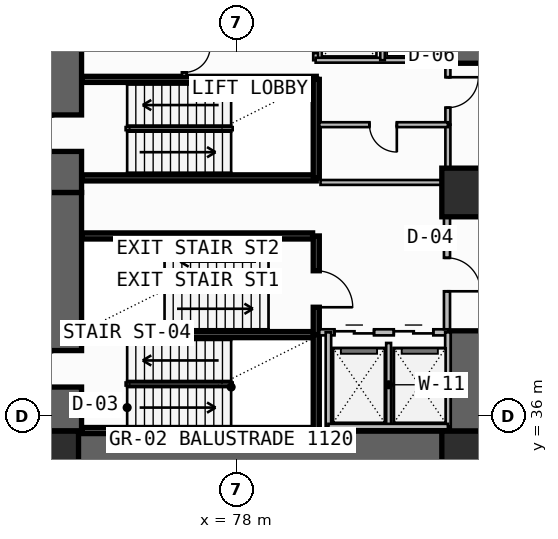
"""IFC4 building model, lengths in metres.
Left out: names, types, materials, properties, quantities, classifications, styles, units other than length and angle.
Written with IfcOpenShell. Run it as: python <this file> out.ifc"""

import sys

from ifc_helpers import new_model, si_unit, direction, frame, frame_2d, origin, origin_2d, place, context, subcontext, project, spatial, rectangle, extrude, element, fill, save


model = new_model("IFC4")
c1 = context("Model", 3, precision=1e-05, world=origin(), true_north=direction((0.0, 1.0)))
c2 = subcontext(c1, "Body", "Model", "MODEL_VIEW")
j1 = project(units=[si_unit("LENGTHUNIT", "METRE"), si_unit("PLANEANGLEUNIT", "RADIAN")], contexts=[c1])
p1 = place(None, origin())
s1 = spatial("IfcSite", under=j1, at=p1, CompositionType="ELEMENT")
p2 = place(p1, origin())
s2 = spatial("IfcBuilding", under=s1, at=p2, CompositionType="ELEMENT")
p3 = place(p2, origin())
s3 = spatial("IfcBuildingStorey", under=s2, at=p3, CompositionType="ELEMENT", Elevation=0.0)
p4 = place(p3, frame((72.35, 35.5, -0.4), z_axis=(0.0, 0.0, 1.0), x_axis=(0.0, 1.0, 0.0)))
e1 = element("IfcWall", 1, at=p4, inside=s3, PredefinedType="SHEAR", context=c2, shape_type="SweptSolid", body=[
    extrude(rectangle(XDim=7.85, YDim=1.1, at=frame_2d((3.925, 0.0))), origin(), (0.0, 0.0, 1.0), 4.58),
])
p5 = place(p4, frame((1.45, 0.0, 0.4)))
e2 = element("IfcOpeningElement", 2, at=p5, cuts=e1, PredefinedType="OPENING", context=c2, shape_type="SweptSolid", body=[
    extrude(rectangle(XDim=1.2, YDim=2.2, at=frame_2d((0.6, 1.1))), frame((0.0, 0.56, 0.0), z_axis=(0.0, -1.0, 0.0), x_axis=(1.0, 0.0, 0.0)), (0.0, 0.0, 1.0), 1.12),
])
p6 = place(p3, frame((71.8, 34.95, -0.4), z_axis=(0.0, 0.0, 1.0), x_axis=(1.0, 0.0, 0.0)))
e3 = element("IfcWall", 3, at=p6, inside=s3, PredefinedType="SHEAR", context=c2, shape_type="SweptSolid", body=[
    extrude(rectangle(XDim=14.3, YDim=1.1, at=frame_2d((7.15, 0.0))), origin(), (0.0, 0.0, 1.0), 4.58),
])
p7 = place(p3, frame((85.55, 35.5, -0.4), z_axis=(0.0, 0.0, 1.0), x_axis=(0.0, 1.0, 0.0)))
e4 = element("IfcWall", 4, at=p7, inside=s3, PredefinedType="SHEAR", context=c2, shape_type="SweptSolid", body=[
    extrude(rectangle(XDim=3.3, YDim=1.1, at=frame_2d((1.65, 0.0))), origin(), (0.0, 0.0, 1.0), 4.58),
])
p8 = place(p3, frame((72.35, 43.35, -0.4), z_axis=(0.0, 0.0, 1.0), x_axis=(0.0, 1.0, 0.0)))
e5 = element("IfcWall", 5, at=p8, inside=s3, PredefinedType="SHEAR", context=c2, shape_type="SweptSolid", body=[
    extrude(rectangle(XDim=12.7, YDim=1.1, at=frame_2d((6.35, 0.0))), origin(), (0.0, 0.0, 1.0), 4.58),
])
p9 = place(p8, frame((1.35, 0.0, 0.4)))
e6 = element("IfcOpeningElement", 6, at=p9, cuts=e5, PredefinedType="OPENING", context=c2, shape_type="SweptSolid", body=[
    extrude(rectangle(XDim=1.2, YDim=2.2, at=frame_2d((0.6, 1.1))), frame((0.0, 0.56, 0.0), z_axis=(0.0, -1.0, 0.0), x_axis=(1.0, 0.0, 0.0)), (0.0, 0.0, 1.0), 1.12),
])
p10 = place(p3, frame((85.55, 47.6, -0.4), z_axis=(0.0, 0.0, 1.0), x_axis=(0.0, 1.0, 0.0)))
e7 = element("IfcWall", 7, at=p10, inside=s3, PredefinedType="SHEAR", context=c2, shape_type="SweptSolid", body=[
    extrude(rectangle(XDim=8.45, YDim=1.1, at=frame_2d((4.225, 0.0))), origin(), (0.0, 0.0, 1.0), 4.58),
])
for number, where, z_axis, x_axis in (
    (8, (72.0, 34.7, 0.0), (0.0, 0.0, 1.0), (1.0, 0.0, 0.0)),
    (9, (85.55, 34.7, 0.0), (0.0, 0.0, 1.0), (1.0, 0.0, 0.0)),
    (10, (85.55, 43.35, 0.0), (0.0, 0.0, 1.0), (1.0, 0.0, 0.0)),
):
    element("IfcColumn", number, at=place(p3, frame(where, z_axis=z_axis, x_axis=x_axis)), inside=s3, PredefinedType="COLUMN", context=c2, shape_type="SweptSolid", body=[
        extrude(rectangle(XDim=1.6, YDim=1.6, at=origin_2d()), origin(), (0.0, 0.0, 1.0), 4.5),
    ])
for number, where, z_axis, x_axis in (
    (11, (72.92, 35.52, -0.4), (0.0, 0.0, 1.0), (1.0, 0.0, 0.0)),
    (12, (72.92, 38.675, -0.4), (0.0, 0.0, 1.0), (1.0, 0.0, 0.0)),
):
    element("IfcWall", number, at=place(p3, frame(where, z_axis=z_axis, x_axis=x_axis)), inside=s3, PredefinedType="SOLIDWALL", context=c2, shape_type="SweptSolid", body=[
        extrude(rectangle(XDim=7.7, YDim=0.2, at=frame_2d((3.85, 0.0))), origin(), (0.0, 0.0, 1.0), 4.58),
    ])
p11 = place(p3, frame((80.62, 35.52, -0.4), z_axis=(0.0, 0.0, 1.0), x_axis=(0.0, 1.0, 0.0)))
e13 = element("IfcWall", 13, at=p11, inside=s3, PredefinedType="SOLIDWALL", context=c2, shape_type="SweptSolid", body=[
    extrude(rectangle(XDim=3.155, YDim=0.2, at=frame_2d((1.578, 0.0))), origin(), (0.0, 0.0, 1.0), 4.58),
])
p12 = place(p3, frame((80.62, 38.675, -0.4), z_axis=(0.0, 0.0, 1.0), x_axis=(0.0, 1.0, 0.0)))
e14 = element("IfcWall", 14, at=p12, inside=s3, PredefinedType="SOLIDWALL", context=c2, shape_type="SweptSolid", body=[
    extrude(rectangle(XDim=3.245, YDim=0.2, at=frame_2d((1.623, 0.0))), origin(), (0.0, 0.0, 1.0), 4.58),
])
p13 = place(p12, frame((0.9, 0.0, 0.4)))
e15 = element("IfcOpeningElement", 15, at=p13, cuts=e14, PredefinedType="OPENING", context=c2, shape_type="SweptSolid", body=[
    extrude(rectangle(XDim=1.2, YDim=2.2, at=frame_2d((0.6, 1.1))), frame((0.0, 0.11, 0.0), z_axis=(0.0, -1.0, 0.0), x_axis=(1.0, 0.0, 0.0)), (0.0, 0.0, 1.0), 0.22),
])
p14 = place(p3, frame((80.72, 38.75, 0.0), z_axis=(0.0, 0.0, 1.0), x_axis=(1.0, 0.0, 0.0)))
e16 = element("IfcWall", 16, at=p14, inside=s3, PredefinedType="SOLIDWALL", context=c2, shape_type="SweptSolid", body=[
    extrude(rectangle(XDim=4.26, YDim=0.2, at=frame_2d((2.13, 0.0))), origin(), (0.0, 0.0, 1.0), 4.18),
])
p15 = place(p14, frame((0.5, 0.0, 0.0)))
e17 = element("IfcOpeningElement", 17, at=p15, cuts=e16, PredefinedType="OPENING", context=c2, shape_type="SweptSolid", body=[
    extrude(rectangle(XDim=1.3, YDim=2.3, at=frame_2d((0.65, 1.15))), frame((0.0, 0.11, 0.0), z_axis=(0.0, -1.0, 0.0), x_axis=(1.0, 0.0, 0.0)), (0.0, 0.0, 1.0), 0.22),
])
p16 = place(p14, frame((2.45, 0.0, 0.0)))
e18 = element("IfcOpeningElement", 18, at=p16, cuts=e16, PredefinedType="OPENING", context=c2, shape_type="SweptSolid", body=[
    extrude(rectangle(XDim=1.3, YDim=2.3, at=frame_2d((0.65, 1.15))), frame((0.0, 0.11, 0.0), z_axis=(0.0, -1.0, 0.0), x_axis=(1.0, 0.0, 0.0)), (0.0, 0.0, 1.0), 0.22),
])
p17 = place(p3, frame((83.0, 35.65, 0.0), z_axis=(0.0, 0.0, 1.0), x_axis=(0.0, 1.0, 0.0)))
e19 = element("IfcWall", 19, at=p17, inside=s3, PredefinedType="PLUMBINGWALL", context=c2, shape_type="SweptSolid", body=[
    extrude(rectangle(XDim=2.75, YDim=0.16, at=frame_2d((1.375, 0.0))), origin(), (0.0, 0.0, 1.0), 4.18),
])
for number, where, z_axis, x_axis in (
    (20, (84.95, 35.65, 0.0), (0.0, 0.0, 1.0), (0.0, 1.0, 0.0)),
    (21, (81.02, 35.65, 0.0), (0.0, 0.0, 1.0), (0.0, 1.0, 0.0)),
):
    element("IfcWall", number, at=place(p3, frame(where, z_axis=z_axis, x_axis=x_axis)), inside=s3, PredefinedType="SOLIDWALL", context=c2, shape_type="SweptSolid", body=[
        extrude(rectangle(XDim=3.1, YDim=0.18, at=frame_2d((1.55, 0.0))), origin(), (0.0, 0.0, 1.0), 4.18),
    ])
p18 = place(p3, frame((81.02, 35.65, 0.0), z_axis=(0.0, 0.0, 1.0), x_axis=(1.0, 0.0, 0.0)))
e22 = element("IfcWall", 22, at=p18, inside=s3, PredefinedType="SOLIDWALL", context=c2, shape_type="SweptSolid", body=[
    extrude(rectangle(XDim=3.93, YDim=0.18, at=frame_2d((1.965, 0.0))), origin(), (0.0, 0.0, 1.0), 4.18),
])
p19 = place(p3, frame((84.92, 38.85, 0.0), z_axis=(0.0, 0.0, 1.0), x_axis=(0.0, 1.0, 0.0)))
e23 = element("IfcWall", 23, at=p19, inside=s3, PredefinedType="SOLIDWALL", context=c2, shape_type="SweptSolid", body=[
    extrude(rectangle(XDim=4.83, YDim=0.2, at=frame_2d((2.415, 0.0))), origin(), (0.0, 0.0, 1.0), 4.18),
])
p20 = place(p19, frame((1.25, 0.0, 0.0)))
e24 = element("IfcOpeningElement", 24, at=p20, cuts=e23, PredefinedType="OPENING", context=c2, shape_type="SweptSolid", body=[
    extrude(rectangle(XDim=1.1, YDim=2.2, at=frame_2d((0.55, 1.1))), frame((0.0, 0.11, 0.0), z_axis=(0.0, -1.0, 0.0), x_axis=(1.0, 0.0, 0.0)), (0.0, 0.0, 1.0), 0.22),
])
p21 = place(p3, frame((72.92, 41.92, -0.4), z_axis=(0.0, 0.0, 1.0), x_axis=(1.0, 0.0, 0.0)))
e25 = element("IfcWall", 25, at=p21, inside=s3, PredefinedType="SOLIDWALL", context=c2, shape_type="SweptSolid", body=[
    extrude(rectangle(XDim=7.58, YDim=0.2, at=frame_2d((3.79, 0.0))), origin(), (0.0, 0.0, 1.0), 4.58),
])
for number, where, z_axis, x_axis in (
    (26, (72.92, 43.83, -0.4), (0.0, 0.0, 1.0), (1.0, 0.0, 0.0)),
    (27, (72.92, 47.07, -0.4), (0.0, 0.0, 1.0), (1.0, 0.0, 0.0)),
):
    element("IfcWall", number, at=place(p3, frame(where, z_axis=z_axis, x_axis=x_axis)), inside=s3, PredefinedType="SOLIDWALL", context=c2, shape_type="SweptSolid", body=[
        extrude(rectangle(XDim=7.7, YDim=0.2, at=frame_2d((3.85, 0.0))), origin(), (0.0, 0.0, 1.0), 4.58),
    ])
p22 = place(p3, frame((80.62, 43.83, -0.4), z_axis=(0.0, 0.0, 1.0), x_axis=(0.0, 1.0, 0.0)))
e28 = element("IfcWall", 28, at=p22, inside=s3, PredefinedType="SOLIDWALL", context=c2, shape_type="SweptSolid", body=[
    extrude(rectangle(XDim=3.24, YDim=0.2, at=frame_2d((1.62, 0.0))), origin(), (0.0, 0.0, 1.0), 4.58),
])
p23 = place(p3, frame((84.95, 43.68, 0.0), z_axis=(0.0, 0.0, 1.0), x_axis=(0.0, 1.0, 0.0)))
e29 = element("IfcWall", 29, at=p23, inside=s3, PredefinedType="PLUMBINGWALL", context=c2, shape_type="SweptSolid", body=[
    extrude(rectangle(XDim=1.9, YDim=0.165, at=frame_2d((0.95, 0.0))), origin(), (0.0, 0.0, 1.0), 4.18),
])
p24 = place(p3, frame((84.95, 45.58, 0.0), z_axis=(0.0, 0.0, 1.0), x_axis=(0.0, 1.0, 0.0)))
e30 = element("IfcWall", 30, at=p24, inside=s3, PredefinedType="PARTITIONING", context=c2, shape_type="SweptSolid", body=[
    extrude(rectangle(XDim=2.12, YDim=0.165, at=frame_2d((1.06, 0.0))), origin(), (0.0, 0.0, 1.0), 4.18),
])
p25 = place(p24, frame((0.56, 0.0, 0.0)))
e31 = element("IfcOpeningElement", 31, at=p25, cuts=e30, PredefinedType="OPENING", context=c2, shape_type="SweptSolid", body=[
    extrude(rectangle(XDim=1.0, YDim=2.2, at=frame_2d((0.5, 1.1))), frame((0.0, 0.093, 0.0), z_axis=(0.0, -1.0, 0.0), x_axis=(1.0, 0.0, 0.0)), (0.0, 0.0, 1.0), 0.185),
])
p26 = place(p3, frame((80.72, 45.58, 0.0), z_axis=(0.0, 0.0, 1.0), x_axis=(1.0, 0.0, 0.0)))
e32 = element("IfcWall", 32, at=p26, inside=s3, PredefinedType="PLUMBINGWALL", context=c2, shape_type="SweptSolid", body=[
    extrude(rectangle(XDim=4.23, YDim=0.16, at=frame_2d((2.115, 0.0))), origin(), (0.0, 0.0, 1.0), 4.18),
])
p27 = place(p26, frame((1.65, 0.0, 0.0)))
e33 = element("IfcOpeningElement", 33, at=p27, cuts=e32, PredefinedType="OPENING", context=c2, shape_type="SweptSolid", body=[
    extrude(rectangle(XDim=0.9, YDim=2.1, at=frame_2d((0.45, 1.05))), frame((0.0, 0.09, 0.0), z_axis=(0.0, -1.0, 0.0), x_axis=(1.0, 0.0, 0.0)), (0.0, 0.0, 1.0), 0.18),
])
p28 = place(p3, frame((80.76, 43.68, 0.0), z_axis=(0.0, 0.0, 1.0), x_axis=(1.0, 0.0, 0.0)))
e34 = element("IfcWall", 34, at=p28, inside=s3, PredefinedType="PLUMBINGWALL", context=c2, shape_type="SweptSolid", body=[
    extrude(rectangle(XDim=4.19, YDim=0.16, at=frame_2d((2.095, 0.0))), origin(), (0.0, 0.0, 1.0), 4.18),
])
p29 = place(p3, frame((76.28, 47.18, 0.0), z_axis=(0.0, 0.0, 1.0), x_axis=(0.0, 1.0, 0.0)))
e35 = element("IfcWall", 35, at=p29, inside=s3, PredefinedType="SOLIDWALL", context=c2, shape_type="SweptSolid", body=[
    extrude(rectangle(XDim=5.14, YDim=0.16, at=frame_2d((2.57, 0.0))), origin(), (0.0, 0.0, 1.0), 4.18),
])
p30 = place(p29, frame((1.1, 0.0, 0.0)))
e36 = element("IfcOpeningElement", 36, at=p30, cuts=e35, PredefinedType="OPENING", context=c2, shape_type="SweptSolid", body=[
    extrude(rectangle(XDim=1.1, YDim=2.25, at=frame_2d((0.55, 1.125))), frame((0.0, 0.09, 0.0), z_axis=(0.0, -1.0, 0.0), x_axis=(1.0, 0.0, 0.0)), (0.0, 0.0, 1.0), 0.18),
])
p31 = place(p29, frame((2.5, 0.0, 0.0)))
e37 = element("IfcOpeningElement", 37, at=p31, cuts=e35, PredefinedType="OPENING", context=c2, shape_type="SweptSolid", body=[
    extrude(rectangle(XDim=1.1, YDim=2.25, at=frame_2d((0.55, 1.125))), frame((0.0, 0.09, 0.0), z_axis=(0.0, -1.0, 0.0), x_axis=(1.0, 0.0, 0.0)), (0.0, 0.0, 1.0), 0.18),
])
p32 = place(p29, frame((3.9, 0.0, 0.0)))
e38 = element("IfcOpeningElement", 38, at=p32, cuts=e35, PredefinedType="OPENING", context=c2, shape_type="SweptSolid", body=[
    extrude(rectangle(XDim=1.1, YDim=2.25, at=frame_2d((0.55, 1.125))), frame((0.0, 0.09, 0.0), z_axis=(0.0, -1.0, 0.0), x_axis=(1.0, 0.0, 0.0)), (0.0, 0.0, 1.0), 0.18),
])
p33 = place(p29, frame((0.12, 0.0, 0.0)))
e39 = element("IfcOpeningElement", 39, at=p33, cuts=e35, PredefinedType="OPENING", context=c2, shape_type="SweptSolid", body=[
    extrude(rectangle(XDim=0.85, YDim=2.05, at=frame_2d((0.425, 1.025))), frame((0.0, 0.09, 0.0), z_axis=(0.0, -1.0, 0.0), x_axis=(1.0, 0.0, 0.0)), (0.0, 0.0, 1.0), 0.18),
])
p34 = place(p3, frame((80.6, 47.7, 0.0), z_axis=(0.0, 0.0, 1.0), x_axis=(0.0, 1.0, 0.0)))
e40 = element("IfcWall", 40, at=p34, inside=s3, PredefinedType="SOLIDWALL", context=c2, shape_type="SweptSolid", body=[
    extrude(rectangle(XDim=4.6, YDim=0.16, at=frame_2d((2.3, 0.0))), origin(), (0.0, 0.0, 1.0), 4.18),
])
p35 = place(p34, frame((0.24, 0.0, 0.0)))
e41 = element("IfcOpeningElement", 41, at=p35, cuts=e40, PredefinedType="OPENING", context=c2, shape_type="SweptSolid", body=[
    extrude(rectangle(XDim=1.1, YDim=2.25, at=frame_2d((0.55, 1.125))), frame((0.0, 0.09, 0.0), z_axis=(0.0, -1.0, 0.0), x_axis=(1.0, 0.0, 0.0)), (0.0, 0.0, 1.0), 0.18),
])
p36 = place(p34, frame((1.76, 0.0, 0.0)))
e42 = element("IfcOpeningElement", 42, at=p36, cuts=e40, PredefinedType="OPENING", context=c2, shape_type="SweptSolid", body=[
    extrude(rectangle(XDim=1.1, YDim=2.25, at=frame_2d((0.55, 1.125))), frame((0.0, 0.09, 0.0), z_axis=(0.0, -1.0, 0.0), x_axis=(1.0, 0.0, 0.0)), (0.0, 0.0, 1.0), 0.18),
])
p37 = place(p34, frame((3.28, 0.0, 0.0)))
e43 = element("IfcOpeningElement", 43, at=p37, cuts=e40, PredefinedType="OPENING", context=c2, shape_type="SweptSolid", body=[
    extrude(rectangle(XDim=1.1, YDim=2.25, at=frame_2d((0.55, 1.125))), frame((0.0, 0.09, 0.0), z_axis=(0.0, -1.0, 0.0), x_axis=(1.0, 0.0, 0.0)), (0.0, 0.0, 1.0), 0.18),
])
p38 = place(p3, frame((80.6, 47.7, 0.0), z_axis=(0.0, 0.0, 1.0), x_axis=(1.0, 0.0, 0.0)))
e44 = element("IfcWall", 44, at=p38, inside=s3, PredefinedType="SOLIDWALL", context=c2, shape_type="SweptSolid", body=[
    extrude(rectangle(XDim=4.4, YDim=0.16, at=frame_2d((2.2, 0.0))), origin(), (0.0, 0.0, 1.0), 4.18),
])
p39 = place(p3, frame((82.8, 47.7, 0.0), z_axis=(0.0, 0.0, 1.0), x_axis=(0.0, 1.0, 0.0)))
e45 = element("IfcWall", 45, at=p39, inside=s3, PredefinedType="PLUMBINGWALL", context=c2, shape_type="SweptSolid", body=[
    extrude(rectangle(XDim=4.6, YDim=0.15, at=frame_2d((2.3, 0.0))), origin(), (0.0, 0.0, 1.0), 4.18),
])
p40 = place(p3, frame((84.78, 47.7, 0.0), z_axis=(0.0, 0.0, 1.0), x_axis=(0.0, 1.0, 0.0)))
e46 = element("IfcWall", 46, at=p40, inside=s3, PredefinedType="SOLIDWALL", context=c2, shape_type="SweptSolid", body=[
    extrude(rectangle(XDim=4.6, YDim=0.16, at=frame_2d((2.3, 0.0))), origin(), (0.0, 0.0, 1.0), 4.18),
])
p41 = place(p5, origin())
e47 = element("IfcDoor", 47, at=p41, inside=s3, OperationType="SINGLE_SWING_LEFT", PredefinedType="USERDEFINED", context=c2, shape_type="SweptSolid", body=[
    extrude(rectangle(XDim=1.2, YDim=2.2, at=frame_2d((0.6, 1.1))), frame((0.0, 0.025, 0.0), z_axis=(0.0, -1.0, 0.0), x_axis=(1.0, 0.0, 0.0)), (0.0, 0.0, 1.0), 0.05),
])
fill(e2, e47)
p42 = place(p13, frame((1.2, 0.0, 0.0), z_axis=(0.0, 0.0, 1.0), x_axis=(-1.0, 0.0, 0.0)))
e48 = element("IfcDoor", 48, at=p42, inside=s3, OperationType="SINGLE_SWING_RIGHT", PredefinedType="USERDEFINED", context=c2, shape_type="SweptSolid", body=[
    extrude(rectangle(XDim=1.2, YDim=2.2, at=frame_2d((0.6, 1.1))), frame((0.0, 0.025, 0.0), z_axis=(0.0, -1.0, 0.0), x_axis=(1.0, 0.0, 0.0)), (0.0, 0.0, 1.0), 0.05),
])
fill(e15, e48)
p43 = place(p15, origin())
e49 = element("IfcDoor", 49, at=p43, inside=s3, OperationType="DOUBLE_DOOR_SLIDING", PredefinedType="DOOR", context=c2, shape_type="SweptSolid", body=[
    extrude(rectangle(XDim=1.3, YDim=2.3, at=frame_2d((0.65, 1.15))), frame((0.0, 0.025, 0.0), z_axis=(0.0, -1.0, 0.0), x_axis=(1.0, 0.0, 0.0)), (0.0, 0.0, 1.0), 0.05),
])
fill(e17, e49)
p44 = place(p16, origin())
e50 = element("IfcDoor", 50, at=p44, inside=s3, OperationType="DOUBLE_DOOR_SLIDING", PredefinedType="DOOR", context=c2, shape_type="SweptSolid", body=[
    extrude(rectangle(XDim=1.3, YDim=2.3, at=frame_2d((0.65, 1.15))), frame((0.0, 0.025, 0.0), z_axis=(0.0, -1.0, 0.0), x_axis=(1.0, 0.0, 0.0)), (0.0, 0.0, 1.0), 0.05),
])
fill(e18, e50)
p45 = place(p20, frame((1.1, 0.0, 0.0), z_axis=(0.0, 0.0, 1.0), x_axis=(-1.0, 0.0, 0.0)))
e51 = element("IfcDoor", 51, at=p45, inside=s3, OperationType="SINGLE_SWING_RIGHT", PredefinedType="DOOR", context=c2, shape_type="SweptSolid", body=[
    extrude(rectangle(XDim=1.1, YDim=2.2, at=frame_2d((0.55, 1.1))), frame((0.0, 0.025, 0.0), z_axis=(0.0, -1.0, 0.0), x_axis=(1.0, 0.0, 0.0)), (0.0, 0.0, 1.0), 0.05),
])
fill(e24, e51)
p46 = place(p9, origin())
e52 = element("IfcDoor", 52, at=p46, inside=s3, OperationType="SINGLE_SWING_LEFT", PredefinedType="USERDEFINED", context=c2, shape_type="SweptSolid", body=[
    extrude(rectangle(XDim=1.2, YDim=2.2, at=frame_2d((0.6, 1.1))), frame((0.0, 0.025, 0.0), z_axis=(0.0, -1.0, 0.0), x_axis=(1.0, 0.0, 0.0)), (0.0, 0.0, 1.0), 0.05),
])
fill(e6, e52)
p47 = place(p25, frame((1.0, 0.0, 0.0), z_axis=(0.0, 0.0, 1.0), x_axis=(-1.0, 0.0, 0.0)))
e53 = element("IfcDoor", 53, at=p47, inside=s3, OperationType="SINGLE_SWING_LEFT", PredefinedType="DOOR", context=c2, shape_type="SweptSolid", body=[
    extrude(rectangle(XDim=1.0, YDim=2.2, at=frame_2d((0.5, 1.1))), frame((0.0, 0.025, 0.0), z_axis=(0.0, -1.0, 0.0), x_axis=(1.0, 0.0, 0.0)), (0.0, 0.0, 1.0), 0.05),
])
fill(e31, e53)
p48 = place(p27, frame((0.9, 0.0, 0.0), z_axis=(0.0, 0.0, 1.0), x_axis=(-1.0, 0.0, 0.0)))
e54 = element("IfcDoor", 54, at=p48, inside=s3, OperationType="SINGLE_SWING_LEFT", PredefinedType="DOOR", context=c2, shape_type="SweptSolid", body=[
    extrude(rectangle(XDim=0.9, YDim=2.1, at=frame_2d((0.45, 1.05))), frame((0.0, 0.025, 0.0), z_axis=(0.0, -1.0, 0.0), x_axis=(1.0, 0.0, 0.0)), (0.0, 0.0, 1.0), 0.05),
])
fill(e33, e54)
p49 = place(p33, frame((0.85, 0.0, 0.0), z_axis=(0.0, 0.0, 1.0), x_axis=(-1.0, 0.0, 0.0)))
e55 = element("IfcDoor", 55, at=p49, inside=s3, OperationType="SINGLE_SWING_LEFT", PredefinedType="DOOR", context=c2, shape_type="SweptSolid", body=[
    extrude(rectangle(XDim=0.85, YDim=2.05, at=frame_2d((0.425, 1.025))), frame((0.0, 0.025, 0.0), z_axis=(0.0, -1.0, 0.0), x_axis=(1.0, 0.0, 0.0)), (0.0, 0.0, 1.0), 0.05),
])
fill(e39, e55)
p50 = place(p35, frame((1.1, 0.0, 0.0), z_axis=(0.0, 0.0, 1.0), x_axis=(-1.0, 0.0, 0.0)))
e56 = element("IfcDoor", 56, at=p50, inside=s3, OperationType="DOUBLE_DOOR_SLIDING", PredefinedType="DOOR", context=c2, shape_type="SweptSolid", body=[
    extrude(rectangle(XDim=1.1, YDim=2.25, at=frame_2d((0.55, 1.125))), frame((0.0, 0.025, 0.0), z_axis=(0.0, -1.0, 0.0), x_axis=(1.0, 0.0, 0.0)), (0.0, 0.0, 1.0), 0.05),
])
fill(e41, e56)
save(model, sys.argv[1])
